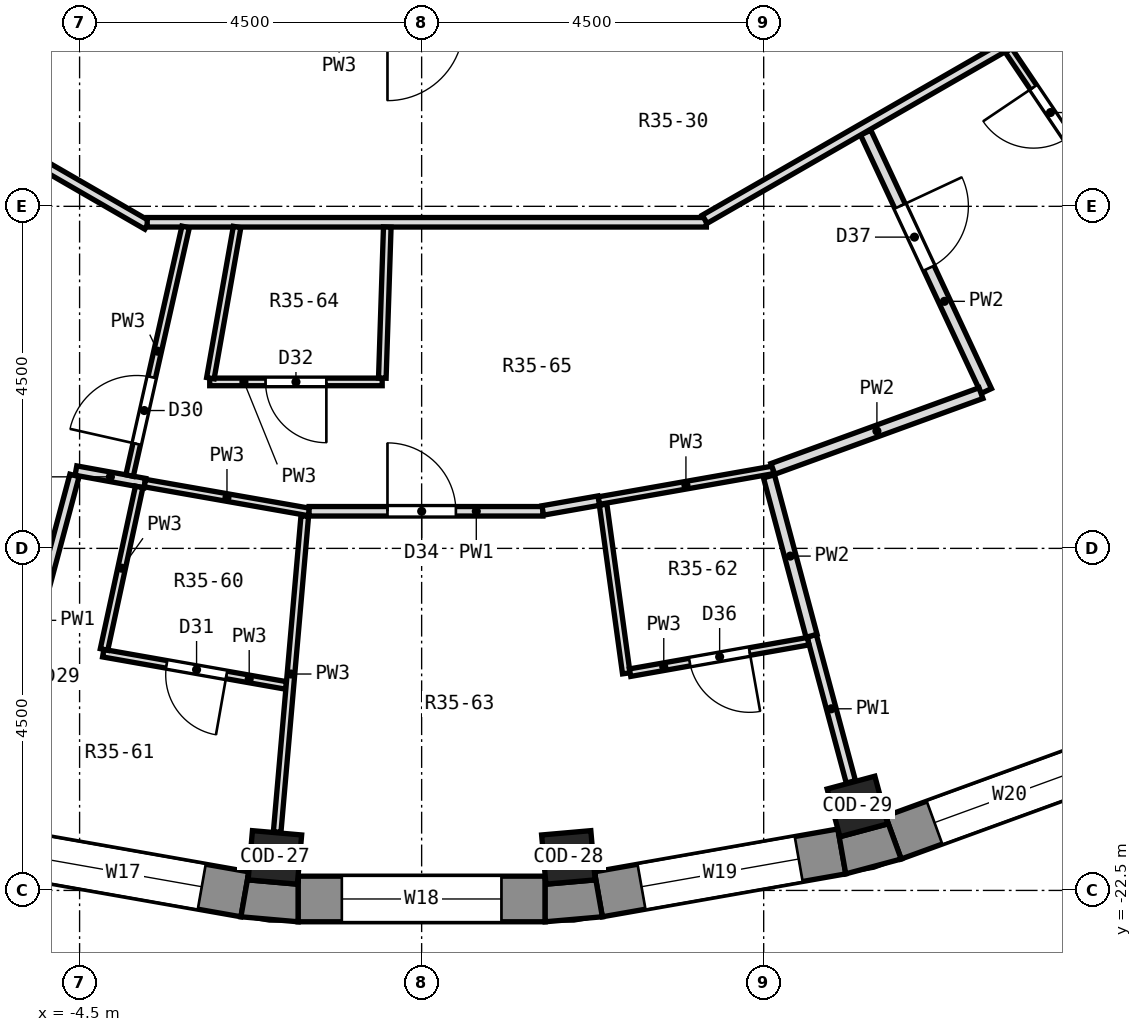
"""IFC4 building model, lengths in metres.
Left out: names, types, materials, properties, quantities, classifications, styles, units other than length and angle.
Written with IfcOpenShell. Run it as: python <this file> out.ifc"""

import sys

from ifc_helpers import new_model, si_unit, direction, frame, frame_2d, origin, origin_2d, place, context, subcontext, project, spatial, polyline, rectangle, outline, extrude, element, fill, save


model = new_model("IFC4")
c1 = context("Model", 3, precision=1e-05, world=origin(), true_north=direction((0.0, 1.0)))
c2 = subcontext(c1, "Body", "Model", "MODEL_VIEW")
j1 = project(units=[si_unit("LENGTHUNIT", "METRE"), si_unit("PLANEANGLEUNIT", "RADIAN")], contexts=[c1])
p1 = place(None, origin())
s1 = spatial("IfcSite", under=j1, at=p1, CompositionType="ELEMENT")
p2 = place(p1, origin())
s2 = spatial("IfcBuilding", under=s1, at=p2, CompositionType="ELEMENT")
p3 = place(p2, frame((0.0, 0.0, 249.5)))
s3 = spatial("IfcBuildingStorey", under=s2, at=p3, CompositionType="ELEMENT", Elevation=249.5)
for number, where, z_axis, x_axis in (
    (1, (-1.93, -22.066, 0.0), (0.0, 0.0, 1.0), (-0.087, -0.996, 0.0)),
    (2, (1.93, -22.066, 0.0), (0.0, 0.0, 1.0), (0.087, -0.996, 0.0)),
    (3, (5.733, -21.395, 0.0), (0.0, 0.0, 1.0), (0.259, -0.966, 0.0)),
):
    element("IfcColumn", number, at=place(p3, frame(where, z_axis=z_axis, x_axis=x_axis)), inside=s3, PredefinedType="COLUMN", context=c2, shape_type="SweptSolid", body=[
        extrude(rectangle(XDim=0.65, YDim=0.65, at=origin_2d()), origin(), (0.0, 0.0, 1.0), 3.3),
    ])
p4 = place(p3, frame((-5.528, -21.987, 0.0), z_axis=(0.0, 0.0, 1.0), x_axis=(0.984806225186, -0.173656842178, 0.0)))
e4 = element("IfcWall", 4, at=p4, inside=s3, PredefinedType="SOLIDWALL", context=c2, shape_type="SweptSolid", body=[
    extrude(rectangle(XDim=3.252, YDim=0.6, at=frame_2d((1.626, 0.0))), origin(), (0.0, 0.0, 1.0), 2.9),
])
p5 = place(p4, frame((0.576, 0.0, 0.9)))
e5 = element("IfcOpeningElement", 5, at=p5, cuts=e4, PredefinedType="OPENING", context=c2, shape_type="SweptSolid", body=[
    extrude(rectangle(XDim=2.1, YDim=1.8, at=frame_2d((1.05, 0.9))), frame((0.0, 0.312, 0.0), z_axis=(0.0, -1.0, 0.0), x_axis=(1.0, 0.0, 0.0)), (0.0, 0.0, 1.0), 0.624),
])
p6 = place(p3, frame((-1.626, -22.613, 0.0), z_axis=(0.0, 0.0, 1.0), x_axis=(1.0, 0.0, 0.0)))
e6 = element("IfcWall", 6, at=p6, inside=s3, PredefinedType="SOLIDWALL", context=c2, shape_type="SweptSolid", body=[
    extrude(rectangle(XDim=3.251, YDim=0.6, at=frame_2d((1.626, 0.0))), origin(), (0.0, 0.0, 1.0), 2.9),
])
p7 = place(p6, frame((0.576, 0.0, 0.9)))
e7 = element("IfcOpeningElement", 7, at=p7, cuts=e6, PredefinedType="OPENING", context=c2, shape_type="SweptSolid", body=[
    extrude(rectangle(XDim=2.1, YDim=1.8, at=frame_2d((1.05, 0.9))), frame((0.0, 0.312, 0.0), z_axis=(0.0, -1.0, 0.0), x_axis=(1.0, 0.0, 0.0)), (0.0, 0.0, 1.0), 0.624),
])
p8 = place(p3, frame((2.325, -22.551, 0.0), z_axis=(0.0, 0.0, 1.0), x_axis=(0.984806225186, 0.173656842178, 0.0)))
e8 = element("IfcWall", 8, at=p8, inside=s3, PredefinedType="SOLIDWALL", context=c2, shape_type="SweptSolid", body=[
    extrude(rectangle(XDim=3.252, YDim=0.6, at=frame_2d((1.626, 0.0))), origin(), (0.0, 0.0, 1.0), 2.9),
])
p9 = place(p8, frame((0.576, 0.0, 0.9)))
e9 = element("IfcOpeningElement", 9, at=p9, cuts=e8, PredefinedType="OPENING", context=c2, shape_type="SweptSolid", body=[
    extrude(rectangle(XDim=2.1, YDim=1.8, at=frame_2d((1.05, 0.9))), frame((0.0, 0.312, 0.0), z_axis=(0.0, -1.0, 0.0), x_axis=(1.0, 0.0, 0.0)), (0.0, 0.0, 1.0), 0.624),
])
p10 = place(p3, frame((6.206, -21.805, 0.0), z_axis=(0.0, 0.0, 1.0), x_axis=(0.939679383794, 0.342056509473, 0.0)))
e10 = element("IfcWall", 10, at=p10, inside=s3, PredefinedType="SOLIDWALL", context=c2, shape_type="SweptSolid", body=[
    extrude(rectangle(XDim=3.252, YDim=0.6, at=frame_2d((1.626, 0.0))), origin(), (0.0, 0.0, 1.0), 2.9),
])
p11 = place(p10, frame((0.576, 0.0, 0.9)))
e11 = element("IfcOpeningElement", 11, at=p11, cuts=e10, PredefinedType="OPENING", context=c2, shape_type="SweptSolid", body=[
    extrude(rectangle(XDim=2.1, YDim=1.8, at=frame_2d((1.05, 0.9))), frame((0.0, 0.312, 0.0), z_axis=(0.0, -1.0, 0.0), x_axis=(1.0, 0.0, 0.0)), (0.0, 0.0, 1.0), 0.624),
])
p12 = place(p3, origin())
e12 = element("IfcWall", 12, at=p12, inside=s3, PredefinedType="SOLIDWALL", context=c2, shape_type="SweptSolid", body=[
    extrude(outline(polyline([(-2.378, -22.847), (-1.626, -22.913), (-1.626, -22.312), (-1.635, -22.418), (-2.283, -22.361), (-2.273, -22.256), (-2.378, -22.847)])), origin(), (0.0, 0.0, 1.0), 2.9),
])
p13 = place(p3, origin())
e13 = element("IfcWall", 13, at=p13, inside=s3, PredefinedType="SOLIDWALL", context=c2, shape_type="SweptSolid", body=[
    extrude(outline(polyline([(1.626, -22.913), (2.378, -22.847), (2.273, -22.256), (2.283, -22.361), (1.635, -22.418), (1.626, -22.312), (1.626, -22.913)])), origin(), (0.0, 0.0, 1.0), 2.9),
])
p14 = place(p3, origin())
e14 = element("IfcWall", 14, at=p14, inside=s3, PredefinedType="SOLIDWALL", context=c2, shape_type="SweptSolid", body=[
    extrude(outline(polyline([(6.309, -22.087), (6.104, -21.523), (6.131, -21.625), (5.503, -21.793), (5.476, -21.691), (5.58, -22.282), (6.309, -22.087)])), origin(), (0.0, 0.0, 1.0), 2.9),
])
p15 = place(p3, frame((2.387, -17.425, 0.0), z_axis=(0.0, 0.0, 1.0), x_axis=(0.136139445073, -0.990689684763, 0.0)))
e15 = element("IfcWall", 15, at=p15, inside=s3, PredefinedType="PARTITIONING", context=c2, shape_type="SweptSolid", body=[
    extrude(rectangle(XDim=2.24, YDim=0.1, at=frame_2d((1.12, 0.0))), origin(), (0.0, 0.0, 1.0), 2.9),
])
p16 = place(p3, frame((5.132, -19.149, 0.0), z_axis=(0.0, 0.0, 1.0), x_axis=(0.259128566087, -0.965842837235, 0.0)))
e16 = element("IfcWall", 16, at=p16, inside=s3, PredefinedType="PARTITIONING", context=c2, shape_type="SweptSolid", body=[
    extrude(rectangle(XDim=1.99, YDim=0.125, at=frame_2d((0.995, 0.0))), origin(), (0.0, 0.0, 1.0), 2.9),
])
p17 = place(p3, frame((4.57, -17.052, 0.0), z_axis=(0.0, 0.0, 1.0), x_axis=(0.257984618888, -0.966149023918, 0.0)))
e17 = element("IfcWall", 17, at=p17, inside=s3, PredefinedType="PARTITIONING", context=c2, shape_type="SweptSolid", body=[
    extrude(rectangle(XDim=2.171, YDim=0.15, at=frame_2d((1.085, 0.0))), origin(), (0.0, 0.0, 1.0), 2.9),
])
p18 = place(p3, frame((5.842, -12.53, 0.0), z_axis=(0.0, 0.0, 1.0), x_axis=(0.422999465209, -0.906129931319, 0.0)))
e18 = element("IfcWall", 18, at=p18, inside=s3, PredefinedType="PARTITIONING", context=c2, shape_type="SweptSolid", body=[
    extrude(rectangle(XDim=3.751, YDim=0.15, at=frame_2d((1.876, 0.0))), origin(), (0.0, 0.0, 1.0), 2.9),
])
p19 = place(p18, frame((1.068, 0.0, 0.0)))
e19 = element("IfcOpeningElement", 19, at=p19, cuts=e18, PredefinedType="OPENING", context=c2, shape_type="SweptSolid", body=[
    extrude(rectangle(XDim=0.9, YDim=2.1, at=frame_2d((0.45, 1.05))), frame((0.0, 0.087, 0.0), z_axis=(0.0, -1.0, 0.0), x_axis=(1.0, 0.0, 0.0)), (0.0, 0.0, 1.0), 0.174),
])
p20 = place(p3, frame((7.721, -11.448, 0.0), z_axis=(0.0, 0.0, 1.0), x_axis=(0.559248794195, -0.828999871044, 0.0)))
e20 = element("IfcWall", 20, at=p20, inside=s3, PredefinedType="PARTITIONING", context=c2, shape_type="SweptSolid", body=[
    extrude(rectangle(XDim=2.04, YDim=0.1, at=frame_2d((1.02, 0.0))), origin(), (0.0, 0.0, 1.0), 2.9),
])
p21 = place(p20, frame((0.587, 0.0, 0.0)))
e21 = element("IfcOpeningElement", 21, at=p21, cuts=e20, PredefinedType="OPENING", context=c2, shape_type="SweptSolid", body=[
    extrude(rectangle(XDim=0.8, YDim=2.1, at=frame_2d((0.4, 1.05))), frame((0.0, 0.062, 0.0), z_axis=(0.0, -1.0, 0.0), x_axis=(1.0, 0.0, 0.0)), (0.0, 0.0, 1.0), 0.124),
])
p22 = place(p3, frame((-10.036, -10.036, 0.0), z_axis=(0.0, 0.0, 1.0), x_axis=(0.865964194244, -0.500106003051, 0.0)))
e22 = element("IfcWall", 22, at=p22, inside=s3, PredefinedType="PARTITIONING", context=c2, shape_type="SweptSolid", body=[
    extrude(rectangle(XDim=7.42, YDim=0.125, at=frame_2d((3.71, 0.0))), origin(), (0.0, 0.0, 1.0), 2.9),
])
p23 = place(p22, frame((3.173, 0.0, 0.0)))
e23 = element("IfcOpeningElement", 23, at=p23, cuts=e22, PredefinedType="OPENING", context=c2, shape_type="SweptSolid", body=[
    extrude(rectangle(XDim=1.0, YDim=2.1, at=frame_2d((0.5, 1.05))), frame((0.0, 0.074, 0.0), z_axis=(0.0, -1.0, 0.0), x_axis=(1.0, 0.0, 0.0)), (0.0, 0.0, 1.0), 0.149),
])
p24 = place(p3, frame((-4.548, -16.976, 0.0), z_axis=(0.0, 0.0, 1.0), x_axis=(0.983882623383, -0.178815501019, 0.0)))
e24 = element("IfcWall", 24, at=p24, inside=s3, PredefinedType="PARTITIONING", context=c2, shape_type="SweptSolid", body=[
    extrude(rectangle(XDim=0.922, YDim=0.125, at=frame_2d((0.461, 0.0))), origin(), (0.0, 0.0, 1.0), 2.9),
])
p25 = place(p3, frame((-4.189, -19.379, 0.0), z_axis=(0.0, 0.0, 1.0), x_axis=(0.98481170555, -0.17362576022, 0.0)))
e25 = element("IfcWall", 25, at=p25, inside=s3, PredefinedType="PARTITIONING", context=c2, shape_type="SweptSolid", body=[
    extrude(rectangle(XDim=2.444, YDim=0.1, at=frame_2d((1.222, 0.0))), origin(), (0.0, 0.0, 1.0), 2.9),
])
p26 = place(p25, frame((0.847, 0.0, 0.0)))
e26 = element("IfcOpeningElement", 26, at=p26, cuts=e25, PredefinedType="OPENING", context=c2, shape_type="SweptSolid", body=[
    extrude(rectangle(XDim=0.8, YDim=2.1, at=frame_2d((0.4, 1.05))), frame((0.0, 0.062, 0.0), z_axis=(0.0, -1.0, 0.0), x_axis=(1.0, 0.0, 0.0)), (0.0, 0.0, 1.0), 0.124),
])
p27 = place(p3, frame((-3.641, -17.141, 0.0), z_axis=(0.0, 0.0, 1.0), x_axis=(0.984870828908, -0.173290075784, 0.0)))
e27 = element("IfcWall", 27, at=p27, inside=s3, PredefinedType="PARTITIONING", context=c2, shape_type="SweptSolid", body=[
    extrude(rectangle(XDim=2.194, YDim=0.1, at=frame_2d((1.097, 0.0))), origin(), (0.0, 0.0, 1.0), 2.9),
])
p28 = place(p3, frame((-1.481, -17.512, 0.0), z_axis=(0.0, 0.0, 1.0), x_axis=(1.0, 0.0, 0.0)))
e28 = element("IfcWall", 28, at=p28, inside=s3, PredefinedType="PARTITIONING", context=c2, shape_type="SweptSolid", body=[
    extrude(rectangle(XDim=3.076, YDim=0.125, at=frame_2d((1.538, 0.0))), origin(), (0.0, 0.0, 1.0), 2.9),
])
p29 = place(p28, frame((1.031, 0.0, 0.0)))
e29 = element("IfcOpeningElement", 29, at=p29, cuts=e28, PredefinedType="OPENING", context=c2, shape_type="SweptSolid", body=[
    extrude(rectangle(XDim=0.9, YDim=2.1, at=frame_2d((0.45, 1.05))), frame((0.0, 0.074, 0.0), z_axis=(0.0, -1.0, 0.0), x_axis=(1.0, 0.0, 0.0)), (0.0, 0.0, 1.0), 0.149),
])
p30 = place(p3, frame((-2.788, -15.81, 0.0), z_axis=(0.0, 0.0, 1.0), x_axis=(1.0, 0.0, 0.0)))
e30 = element("IfcWall", 30, at=p30, inside=s3, PredefinedType="PARTITIONING", context=c2, shape_type="SweptSolid", body=[
    extrude(rectangle(XDim=2.269, YDim=0.1, at=frame_2d((1.135, 0.0))), origin(), (0.0, 0.0, 1.0), 2.9),
])
p31 = place(p30, frame((0.735, 0.0, 0.0)))
e31 = element("IfcOpeningElement", 31, at=p31, cuts=e30, PredefinedType="OPENING", context=c2, shape_type="SweptSolid", body=[
    extrude(rectangle(XDim=0.8, YDim=2.1, at=frame_2d((0.4, 1.05))), frame((0.0, 0.062, 0.0), z_axis=(0.0, -1.0, 0.0), x_axis=(1.0, 0.0, 0.0)), (0.0, 0.0, 1.0), 0.124),
])
p32 = place(p3, frame((-3.611, -13.71, 0.0), z_axis=(0.0, 0.0, 1.0), x_axis=(1.0, 0.0, 0.0)))
e32 = element("IfcWall", 32, at=p32, inside=s3, PredefinedType="PARTITIONING", context=c2, shape_type="SweptSolid", body=[
    extrude(rectangle(XDim=7.357, YDim=0.125, at=frame_2d((3.678, 0.0))), origin(), (0.0, 0.0, 1.0), 2.9),
])
p33 = place(p3, frame((2.742, -19.635, 0.0), z_axis=(0.0, 0.0, 1.0), x_axis=(0.984744284457, 0.174007741867, 0.0)))
e33 = element("IfcWall", 33, at=p33, inside=s3, PredefinedType="PARTITIONING", context=c2, shape_type="SweptSolid", body=[
    extrude(rectangle(XDim=2.38, YDim=0.1, at=frame_2d((1.19, 0.0))), origin(), (0.0, 0.0, 1.0), 2.9),
])
p34 = place(p33, frame((0.796, 0.0, 0.0)))
e34 = element("IfcOpeningElement", 34, at=p34, cuts=e33, PredefinedType="OPENING", context=c2, shape_type="SweptSolid", body=[
    extrude(rectangle(XDim=0.8, YDim=2.1, at=frame_2d((0.4, 1.05))), frame((0.0, 0.062, 0.0), z_axis=(0.0, -1.0, 0.0), x_axis=(1.0, 0.0, 0.0)), (0.0, 0.0, 1.0), 0.124),
])
p35 = place(p3, frame((2.33, -17.372, 0.0), z_axis=(0.0, 0.0, 1.0), x_axis=(0.984801481442, 0.173683741754, 0.0)))
e35 = element("IfcWall", 35, at=p35, inside=s3, PredefinedType="PARTITIONING", context=c2, shape_type="SweptSolid", body=[
    extrude(rectangle(XDim=2.331, YDim=0.1, at=frame_2d((1.165, 0.0))), origin(), (0.0, 0.0, 1.0), 2.9),
])
p36 = place(p3, frame((1.594, -17.501, 0.0), z_axis=(0.0, 0.0, 1.0), x_axis=(0.984852515296, 0.173394126532, 0.0)))
e36 = element("IfcWall", 36, at=p36, inside=s3, PredefinedType="PARTITIONING", context=c2, shape_type="SweptSolid", body=[
    extrude(rectangle(XDim=0.748, YDim=0.125, at=frame_2d((0.374, 0.0))), origin(), (0.0, 0.0, 1.0), 2.9),
])
p37 = place(p3, frame((4.621, -16.955, 0.0), z_axis=(0.0, 0.0, 1.0), x_axis=(0.939663701092, 0.342099589082, 0.0)))
e37 = element("IfcWall", 37, at=p37, inside=s3, PredefinedType="PARTITIONING", context=c2, shape_type="SweptSolid", body=[
    extrude(rectangle(XDim=2.914, YDim=0.15, at=frame_2d((1.457, 0.0))), origin(), (0.0, 0.0, 1.0), 2.9),
])
p38 = place(p3, frame((3.723, -13.67, 0.0), z_axis=(0.0, 0.0, 1.0), x_axis=(0.866630430442, 0.498950595783, 0.0)))
e38 = element("IfcWall", 38, at=p38, inside=s3, PredefinedType="PARTITIONING", context=c2, shape_type="SweptSolid", body=[
    extrude(rectangle(XDim=7.222, YDim=0.125, at=frame_2d((3.611, 0.0))), origin(), (0.0, 0.0, 1.0), 2.9),
])
p39 = place(p3, frame((-5.645, -21.072, 0.0), z_axis=(0.0, 0.0, 1.0), x_axis=(0.258154150775, 0.966103738963, 0.0)))
e39 = element("IfcWall", 39, at=p39, inside=s3, PredefinedType="PARTITIONING", context=c2, shape_type="SweptSolid", body=[
    extrude(rectangle(XDim=4.173, YDim=0.125, at=frame_2d((2.087, 0.0))), origin(), (0.0, 0.0, 1.0), 2.9),
])
p40 = place(p39, frame((0.977, 0.0, 0.0)))
e40 = element("IfcOpeningElement", 40, at=p40, cuts=e39, PredefinedType="OPENING", context=c2, shape_type="SweptSolid", body=[
    extrude(rectangle(XDim=0.9, YDim=2.1, at=frame_2d((0.45, 1.05))), frame((0.0, 0.074, 0.0), z_axis=(0.0, -1.0, 0.0), x_axis=(1.0, 0.0, 0.0)), (0.0, 0.0, 1.0), 0.149),
])
p41 = place(p3, frame((-3.842, -17.042, 0.0), z_axis=(0.0, 0.0, 1.0), x_axis=(0.219959167762, 0.975509079669, 0.0)))
e41 = element("IfcWall", 41, at=p41, inside=s3, PredefinedType="PARTITIONING", context=c2, shape_type="SweptSolid", body=[
    extrude(rectangle(XDim=3.353, YDim=0.1, at=frame_2d((1.677, 0.0))), origin(), (0.0, 0.0, 1.0), 2.9),
])
p42 = place(p41, frame((0.427, 0.0, 0.0)))
e42 = element("IfcOpeningElement", 42, at=p42, cuts=e41, PredefinedType="OPENING", context=c2, shape_type="SweptSolid", body=[
    extrude(rectangle(XDim=0.9, YDim=2.1, at=frame_2d((0.45, 1.05))), frame((0.0, 0.062, 0.0), z_axis=(0.0, -1.0, 0.0), x_axis=(1.0, 0.0, 0.0)), (0.0, 0.0, 1.0), 0.124),
])
p43 = place(p3, frame((-4.178, -19.33, 0.0), z_axis=(0.0, 0.0, 1.0), x_axis=(0.211197399018, 0.977443429897, 0.0)))
e43 = element("IfcWall", 43, at=p43, inside=s3, PredefinedType="PARTITIONING", context=c2, shape_type="SweptSolid", body=[
    extrude(rectangle(XDim=2.188, YDim=0.1, at=frame_2d((1.094, 0.0))), origin(), (0.0, 0.0, 1.0), 2.9),
])
p44 = place(p3, frame((-2.779, -15.761, 0.0), z_axis=(0.0, 0.0, 1.0), x_axis=(0.173916330722, 0.984760432749, 0.0)))
e44 = element("IfcWall", 44, at=p44, inside=s3, PredefinedType="PARTITIONING", context=c2, shape_type="SweptSolid", body=[
    extrude(rectangle(XDim=2.02, YDim=0.1, at=frame_2d((1.01, 0.0))), origin(), (0.0, 0.0, 1.0), 2.9),
])
p45 = place(p3, frame((-1.901, -21.732, 0.0), z_axis=(0.0, 0.0, 1.0), x_axis=(0.087101641285, 0.996199429876, 0.0)))
e45 = element("IfcWall", 45, at=p45, inside=s3, PredefinedType="PARTITIONING", context=c2, shape_type="SweptSolid", body=[
    extrude(rectangle(XDim=4.174, YDim=0.1, at=frame_2d((2.087, 0.0))), origin(), (0.0, 0.0, 1.0), 2.9),
])
p46 = place(p3, frame((-0.517, -15.76, 0.0), z_axis=(0.0, 0.0, 1.0), x_axis=(0.032779329048, 0.999462613401, 0.0)))
e46 = element("IfcWall", 46, at=p46, inside=s3, PredefinedType="PARTITIONING", context=c2, shape_type="SweptSolid", body=[
    extrude(rectangle(XDim=1.989, YDim=0.1, at=frame_2d((0.994, 0.0))), origin(), (0.0, 0.0, 1.0), 2.9),
])
p47 = place(p5, origin())
e47 = element("IfcWindow", 47, at=p47, inside=s3, PartitioningType="SINGLE_PANEL", PredefinedType="WINDOW", context=c2, shape_type="SweptSolid", body=[
    extrude(rectangle(XDim=2.1, YDim=1.8, at=frame_2d((1.05, 0.9))), frame((0.0, 0.18, 0.0), z_axis=(0.0, -1.0, 0.0), x_axis=(1.0, 0.0, 0.0)), (0.0, 0.0, 1.0), 0.06),
])
fill(e5, e47)
p48 = place(p7, origin())
e48 = element("IfcWindow", 48, at=p48, inside=s3, PartitioningType="SINGLE_PANEL", PredefinedType="WINDOW", context=c2, shape_type="SweptSolid", body=[
    extrude(rectangle(XDim=2.1, YDim=1.8, at=frame_2d((1.05, 0.9))), frame((0.0, 0.18, 0.0), z_axis=(0.0, -1.0, 0.0), x_axis=(1.0, 0.0, 0.0)), (0.0, 0.0, 1.0), 0.06),
])
fill(e7, e48)
p49 = place(p9, origin())
e49 = element("IfcWindow", 49, at=p49, inside=s3, PartitioningType="SINGLE_PANEL", PredefinedType="WINDOW", context=c2, shape_type="SweptSolid", body=[
    extrude(rectangle(XDim=2.1, YDim=1.8, at=frame_2d((1.05, 0.9))), frame((0.0, 0.18, 0.0), z_axis=(0.0, -1.0, 0.0), x_axis=(1.0, 0.0, 0.0)), (0.0, 0.0, 1.0), 0.06),
])
fill(e9, e49)
p50 = place(p11, origin())
e50 = element("IfcWindow", 50, at=p50, inside=s3, PartitioningType="SINGLE_PANEL", PredefinedType="WINDOW", context=c2, shape_type="SweptSolid", body=[
    extrude(rectangle(XDim=2.1, YDim=1.8, at=frame_2d((1.05, 0.9))), frame((0.0, 0.18, 0.0), z_axis=(0.0, -1.0, 0.0), x_axis=(1.0, 0.0, 0.0)), (0.0, 0.0, 1.0), 0.06),
])
fill(e11, e50)
p51 = place(p42, origin())
e51 = element("IfcDoor", 51, at=p51, inside=s3, OperationType="SINGLE_SWING_LEFT", PredefinedType="DOOR", context=c2, shape_type="SweptSolid", body=[
    extrude(rectangle(XDim=0.9, YDim=2.1, at=frame_2d((0.45, 1.05))), frame((0.0, 0.025, 0.0), z_axis=(0.0, -1.0, 0.0), x_axis=(1.0, 0.0, 0.0)), (0.0, 0.0, 1.0), 0.05),
])
fill(e42, e51)
p52 = place(p26, frame((0.8, 0.0, 0.0), z_axis=(0.0, 0.0, 1.0), x_axis=(-1.0, 0.0, 0.0)))
e52 = element("IfcDoor", 52, at=p52, inside=s3, OperationType="SINGLE_SWING_LEFT", PredefinedType="DOOR", context=c2, shape_type="SweptSolid", body=[
    extrude(rectangle(XDim=0.8, YDim=2.1, at=frame_2d((0.4, 1.05))), frame((0.0, 0.025, 0.0), z_axis=(0.0, -1.0, 0.0), x_axis=(1.0, 0.0, 0.0)), (0.0, 0.0, 1.0), 0.05),
])
fill(e26, e52)
p53 = place(p31, frame((0.8, 0.0, 0.0), z_axis=(0.0, 0.0, 1.0), x_axis=(-1.0, 0.0, 0.0)))
e53 = element("IfcDoor", 53, at=p53, inside=s3, OperationType="SINGLE_SWING_LEFT", PredefinedType="DOOR", context=c2, shape_type="SweptSolid", body=[
    extrude(rectangle(XDim=0.8, YDim=2.1, at=frame_2d((0.4, 1.05))), frame((0.0, 0.025, 0.0), z_axis=(0.0, -1.0, 0.0), x_axis=(1.0, 0.0, 0.0)), (0.0, 0.0, 1.0), 0.05),
])
fill(e31, e53)
p54 = place(p29, origin())
e54 = element("IfcDoor", 54, at=p54, inside=s3, OperationType="SINGLE_SWING_LEFT", PredefinedType="DOOR", context=c2, shape_type="SweptSolid", body=[
    extrude(rectangle(XDim=0.9, YDim=2.1, at=frame_2d((0.45, 1.05))), frame((0.0, 0.025, 0.0), z_axis=(0.0, -1.0, 0.0), x_axis=(1.0, 0.0, 0.0)), (0.0, 0.0, 1.0), 0.05),
])
fill(e29, e54)
p55 = place(p34, frame((0.8, 0.0, 0.0), z_axis=(0.0, 0.0, 1.0), x_axis=(-1.0, 0.0, 0.0)))
e55 = element("IfcDoor", 55, at=p55, inside=s3, OperationType="SINGLE_SWING_LEFT", PredefinedType="DOOR", context=c2, shape_type="SweptSolid", body=[
    extrude(rectangle(XDim=0.8, YDim=2.1, at=frame_2d((0.4, 1.05))), frame((0.0, 0.025, 0.0), z_axis=(0.0, -1.0, 0.0), x_axis=(1.0, 0.0, 0.0)), (0.0, 0.0, 1.0), 0.05),
])
fill(e34, e55)
p56 = place(p19, origin())
e56 = element("IfcDoor", 56, at=p56, inside=s3, OperationType="SINGLE_SWING_LEFT", PredefinedType="DOOR", context=c2, shape_type="SweptSolid", body=[
    extrude(rectangle(XDim=0.9, YDim=2.1, at=frame_2d((0.45, 1.05))), frame((0.0, 0.025, 0.0), z_axis=(0.0, -1.0, 0.0), x_axis=(1.0, 0.0, 0.0)), (0.0, 0.0, 1.0), 0.05),
])
fill(e19, e56)
p57 = place(p21, frame((0.8, 0.0, 0.0), z_axis=(0.0, 0.0, 1.0), x_axis=(-1.0, 0.0, 0.0)))
e57 = element("IfcDoor", 57, at=p57, inside=s3, OperationType="SINGLE_SWING_RIGHT", PredefinedType="DOOR", context=c2, shape_type="SweptSolid", body=[
    extrude(rectangle(XDim=0.8, YDim=2.1, at=frame_2d((0.4, 1.05))), frame((0.0, 0.025, 0.0), z_axis=(0.0, -1.0, 0.0), x_axis=(1.0, 0.0, 0.0)), (0.0, 0.0, 1.0), 0.05),
])
fill(e21, e57)
save(model, sys.argv[1])
